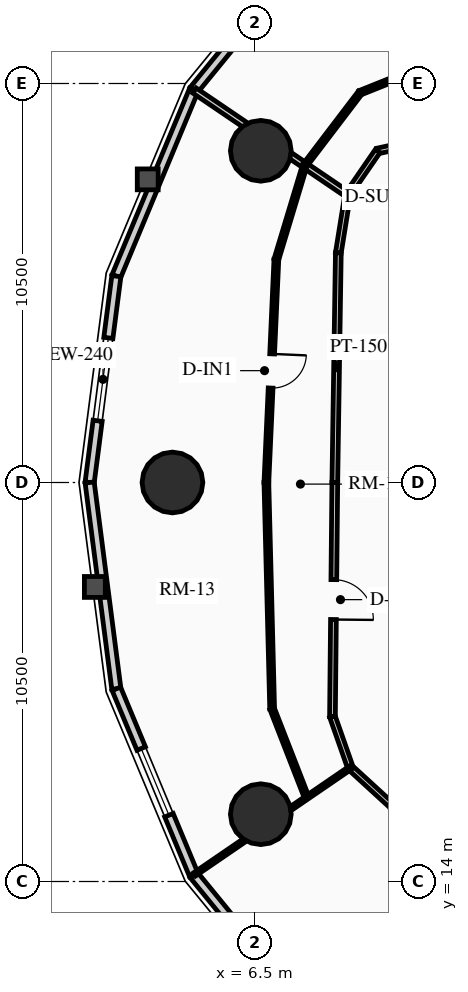
"""IFC4 building model, lengths in metres.
Left out: names, types, materials, properties, quantities, classifications, styles, units other than length and angle.
Written with IfcOpenShell. Run it as: python <this file> out.ifc"""

import sys

from ifc_helpers import new_model, si_unit, direction, frame, frame_2d, origin, origin_2d, place, context, subcontext, project, spatial, rectangle, circle, extrude, source, transform, mapped, element, fill, save


model = new_model("IFC4")
c1 = context("Model", 3, precision=1e-05, world=origin(), true_north=direction((0.0, 1.0)))
c2 = subcontext(c1, "Body", "Model", "MODEL_VIEW")
j1 = project(units=[si_unit("LENGTHUNIT", "METRE"), si_unit("PLANEANGLEUNIT", "RADIAN")], contexts=[c1])
p1 = place(None, origin())
s1 = spatial("IfcSite", under=j1, at=p1, CompositionType="ELEMENT")
p2 = place(p1, origin())
s2 = spatial("IfcBuilding", under=s1, at=p2, CompositionType="ELEMENT")
p3 = place(p2, frame((0.0, 0.0, 24.91)))
s3 = spatial("IfcBuildingStorey", under=s2, at=p3, CompositionType="ELEMENT", Elevation=24.91)
for number, where, z_axis, x_axis in (
    (1, (6.653, 33.229, 0.0), (0.0, 0.0, 1.0), (1.0, 0.0, 0.0)),
    (2, (4.328, 24.5, 0.0), (0.0, 0.0, 1.0), (1.0, 0.0, 0.0)),
    (3, (6.653, 15.771, 0.0), (0.0, 0.0, 1.0), (1.0, 0.0, 0.0)),
):
    element("IfcColumn", number, at=place(p3, frame(where, z_axis=z_axis, x_axis=x_axis)), inside=s3, PredefinedType="USERDEFINED", context=c2, shape_type="SweptSolid", body=[
        extrude(circle(Radius=0.8, at=origin_2d()), origin(), (0.0, 0.0, 1.0), 2.91),
    ])
p4 = place(p3, frame((4.89, 34.827, 0.0), z_axis=(0.0, 0.0, 1.0), x_axis=(0.632588557044, 0.774488035735, 0.0)))
e4 = element("IfcWall", 4, at=p4, inside=s3, PredefinedType="SOLIDWALL", context=c2, shape_type="SweptSolid", body=[
    extrude(rectangle(XDim=5.019, YDim=0.24, at=frame_2d((2.509, 0.0))), origin(), (0.0, 0.0, 1.0), 2.073),
])
m1 = source(origin(), c2, "Body", "SweptSolid", [
    extrude(rectangle(XDim=1.9, YDim=1.35, at=frame_2d((0.95, 0.675))), frame((0.0, 0.13, 0.0), z_axis=(0.0, -1.0, 0.0), x_axis=(1.0, 0.0, 0.0)), (0.0, 0.0, 1.0), 0.26),
])
p5 = place(p4, frame((1.559, 0.0, 0.65)))
e5 = element("IfcOpeningElement", 5, at=p5, cuts=e4, PredefinedType="OPENING", context=c2, shape_type="MappedRepresentation", body=[
    mapped(m1, transform((0.0, 0.0, 0.0), x_axis=(1.0, 0.0, 0.0), y_axis=(0.0, 1.0, 0.0), z_axis=(0.0, 0.0, 1.0), scale=1.0)),
])
p6 = place(p3, frame((2.851, 29.929, 0.0), z_axis=(0.0, 0.0, 1.0), x_axis=(0.384255919668, 0.923226618009, 0.0)))
e6 = element("IfcWall", 6, at=p6, inside=s3, PredefinedType="SOLIDWALL", context=c2, shape_type="SweptSolid", body=[
    extrude(rectangle(XDim=5.305, YDim=0.24, at=frame_2d((2.653, 0.0))), origin(), (0.0, 0.0, 1.0), 2.073),
])
p7 = place(p3, frame((2.149, 24.5, 0.0), z_axis=(0.0, 0.0, 1.0), x_axis=(0.128298189174, 0.991735637483, 0.0)))
e7 = element("IfcWall", 7, at=p7, inside=s3, PredefinedType="SOLIDWALL", context=c2, shape_type="SweptSolid", body=[
    extrude(rectangle(XDim=5.475, YDim=0.24, at=frame_2d((2.737, 0.0))), origin(), (0.0, 0.0, 1.0), 2.073),
])
m2 = source(origin(), c2, "Body", "SweptSolid", [
    extrude(rectangle(XDim=2.2, YDim=1.35, at=frame_2d((1.1, 0.675))), frame((0.0, 0.13, 0.0), z_axis=(0.0, -1.0, 0.0), x_axis=(1.0, 0.0, 0.0)), (0.0, 0.0, 1.0), 0.26),
])
p8 = place(p7, frame((1.637, 0.0, 0.65)))
e8 = element("IfcOpeningElement", 8, at=p8, cuts=e7, PredefinedType="OPENING", context=c2, shape_type="MappedRepresentation", body=[
    mapped(m2, transform((0.0, 0.0, 0.0), x_axis=(1.0, 0.0, 0.0), y_axis=(0.0, 1.0, 0.0), z_axis=(0.0, 0.0, 1.0), scale=1.0)),
])
p9 = place(p3, frame((2.851, 19.071, 0.0), z_axis=(0.0, 0.0, 1.0), x_axis=(-0.128298189174, 0.991735637483, 0.0)))
e9 = element("IfcWall", 9, at=p9, inside=s3, PredefinedType="SOLIDWALL", context=c2, shape_type="SweptSolid", body=[
    extrude(rectangle(XDim=5.475, YDim=0.24, at=frame_2d((2.737, 0.0))), origin(), (0.0, 0.0, 1.0), 2.073),
])
p10 = place(p3, frame((4.89, 14.173, 0.0), z_axis=(0.0, 0.0, 1.0), x_axis=(-0.384255919668, 0.923226618009, 0.0)))
e10 = element("IfcWall", 10, at=p10, inside=s3, PredefinedType="SOLIDWALL", context=c2, shape_type="SweptSolid", body=[
    extrude(rectangle(XDim=5.305, YDim=0.24, at=frame_2d((2.653, 0.0))), origin(), (0.0, 0.0, 1.0), 2.073),
])
p11 = place(p10, frame((1.703, 0.0, 0.65)))
e11 = element("IfcOpeningElement", 11, at=p11, cuts=e10, PredefinedType="OPENING", context=c2, shape_type="MappedRepresentation", body=[
    mapped(m1, transform((0.0, 0.0, 0.0), x_axis=(1.0, 0.0, 0.0), y_axis=(0.0, 1.0, 0.0), z_axis=(0.0, 0.0, 1.0), scale=1.0)),
])
p12 = place(p3, frame((8.065, 10.286, 0.0), z_axis=(0.0, 0.0, 1.0), x_axis=(-0.632588557044, 0.774488035735, 0.0)))
e12 = element("IfcWall", 12, at=p12, inside=s3, PredefinedType="SOLIDWALL", context=c2, shape_type="SweptSolid", body=[
    extrude(rectangle(XDim=5.019, YDim=0.24, at=frame_2d((2.509, 0.0))), origin(), (0.0, 0.0, 1.0), 2.073),
])
p13 = place(p3, frame((11.62, 33.637, 0.0), z_axis=(0.0, 0.0, 1.0), x_axis=(-0.97702579435, -0.213121085711, 0.0)))
e13 = element("IfcWall", 13, at=p13, inside=s3, PredefinedType="PARTITIONING", context=c2, shape_type="SweptSolid", body=[
    extrude(rectangle(XDim=1.935, YDim=0.15, at=frame_2d((0.967, 0.0))), origin(), (0.0, 0.0, 1.0), 2.159),
])
m3 = source(origin(), c2, "Body", "SweptSolid", [
    extrude(rectangle(XDim=1.05, YDim=2.015, at=frame_2d((0.525, 1.007))), frame((0.0, 0.085, 0.0), z_axis=(0.0, -1.0, 0.0), x_axis=(1.0, 0.0, 0.0)), (0.0, 0.0, 1.0), 0.17),
])
p14 = place(p13, frame((0.442, 0.0, 0.0)))
e14 = element("IfcOpeningElement", 14, at=p14, cuts=e13, PredefinedType="OPENING", context=c2, shape_type="MappedRepresentation", body=[
    mapped(m3, transform((0.0, 0.0, 0.0), x_axis=(1.0, 0.0, 0.0), y_axis=(0.0, 1.0, 0.0), z_axis=(0.0, 0.0, 1.0), scale=1.0)),
])
p15 = place(p3, frame((9.729, 33.225, 0.0), z_axis=(0.0, 0.0, 1.0), x_axis=(-0.567183649484, -0.82359134755, 0.0)))
e15 = element("IfcWall", 15, at=p15, inside=s3, PredefinedType="PARTITIONING", context=c2, shape_type="SweptSolid", body=[
    extrude(rectangle(XDim=1.392, YDim=0.15, at=frame_2d((0.696, 0.0))), origin(), (0.0, 0.0, 1.0), 2.159),
])
p16 = place(p3, frame((8.94, 32.078, 0.0), z_axis=(0.0, 0.0, 1.0), x_axis=(-0.159148467753, -0.98725466077, 0.0)))
e16 = element("IfcWall", 16, at=p16, inside=s3, PredefinedType="PARTITIONING", context=c2, shape_type="SweptSolid", body=[
    extrude(rectangle(XDim=1.554, YDim=0.15, at=frame_2d((0.777, 0.0))), origin(), (0.0, 0.0, 1.0), 2.205),
])
p17 = place(p3, frame((8.693, 30.544, 0.0), z_axis=(0.0, 0.0, 1.0), x_axis=(-0.015307007986, -0.99988284089, 0.0)))
e17 = element("IfcWall", 17, at=p17, inside=s3, PredefinedType="PARTITIONING", context=c2, shape_type="SweptSolid", body=[
    extrude(rectangle(XDim=6.045, YDim=0.15, at=frame_2d((3.022, 0.0))), origin(), (0.0, 0.0, 1.0), 2.635),
])
p18 = place(p3, frame((8.6, 24.5, 0.0), z_axis=(0.0, 0.0, 1.0), x_axis=(-0.010023665349, -0.999949761805, 0.0)))
e18 = element("IfcWall", 18, at=p18, inside=s3, PredefinedType="PARTITIONING", context=c2, shape_type="SweptSolid", body=[
    extrude(rectangle(XDim=6.162, YDim=0.15, at=frame_2d((3.081, 0.0))), origin(), (0.0, 0.0, 1.0), 2.159),
])
p19 = place(p18, frame((2.556, 0.0, 0.0)))
e19 = element("IfcOpeningElement", 19, at=p19, cuts=e18, PredefinedType="OPENING", context=c2, shape_type="MappedRepresentation", body=[
    mapped(m3, transform((0.0, 0.0, 0.0), x_axis=(1.0, 0.0, 0.0), y_axis=(0.0, 1.0, 0.0), z_axis=(0.0, 0.0, 1.0), scale=1.0)),
])
p20 = place(p3, frame((8.538, 18.338, 0.0), z_axis=(0.0, 0.0, 1.0), x_axis=(0.331358150167, -0.94350504838, 0.0)))
e20 = element("IfcWall", 20, at=p20, inside=s3, PredefinedType="PARTITIONING", context=c2, shape_type="SweptSolid", body=[
    extrude(rectangle(XDim=1.424, YDim=0.15, at=frame_2d((0.712, 0.0))), origin(), (0.0, 0.0, 1.0), 2.205),
])
p21 = place(p3, frame((9.01, 16.994, 0.0), z_axis=(0.0, 0.0, 1.0), x_axis=(0.737701798986, -0.67512669609, 0.0)))
e21 = element("IfcWall", 21, at=p21, inside=s3, PredefinedType="PARTITIONING", context=c2, shape_type="SweptSolid", body=[
    extrude(rectangle(XDim=1.498, YDim=0.15, at=frame_2d((0.749, 0.0))), origin(), (0.0, 0.0, 1.0), 2.159),
])
p22 = place(p3, frame((8.94, 32.078, 0.0), z_axis=(0.0, 0.0, 1.0), x_axis=(-0.827476605417, 0.561500193666, 0.0)))
e22 = element("IfcWall", 22, at=p22, inside=s3, PredefinedType="PARTITIONING", context=c2, shape_type="SweptSolid", body=[
    extrude(rectangle(XDim=4.875, YDim=0.16, at=frame_2d((2.438, 0.0))), origin(), (0.0, 0.0, 1.0), 2.073),
])
p23 = place(p3, frame((9.01, 16.994, 0.0), z_axis=(0.0, 0.0, 1.0), x_axis=(-0.825130244962, -0.564942544733, 0.0)))
e23 = element("IfcWall", 23, at=p23, inside=s3, PredefinedType="MOVABLE", context=c2, shape_type="SweptSolid", body=[
    extrude(rectangle(XDim=4.974, YDim=0.1, at=frame_2d((2.487, 0.0))), origin(), (0.0, 0.0, 1.0), 2.073),
])
p24 = place(p3, frame((11.746, 35.752, 0.0), z_axis=(0.0, 0.0, 1.0), x_axis=(-0.928091790064, -0.372351486119, 0.0)))
e24 = element("IfcWall", 24, at=p24, inside=s3, PredefinedType="PARTITIONING", context=c2, shape_type="SweptSolid", body=[
    extrude(rectangle(XDim=2.672, YDim=0.125, at=frame_2d((1.336, 0.0))), origin(), (0.0, 0.0, 1.0), 2.205),
])
m4 = source(origin(), c2, "Body", "SweptSolid", [
    extrude(rectangle(XDim=0.9, YDim=2.005, at=frame_2d((0.45, 1.002))), frame((0.0, 0.073, 0.0), z_axis=(0.0, -1.0, 0.0), x_axis=(1.0, 0.0, 0.0)), (0.0, 0.0, 1.0), 0.145),
])
p25 = place(p24, frame((0.886, 0.0, 0.0)))
e25 = element("IfcOpeningElement", 25, at=p25, cuts=e24, PredefinedType="OPENING", context=c2, shape_type="MappedRepresentation", body=[
    mapped(m4, transform((0.0, 0.0, 0.0), x_axis=(1.0, 0.0, 0.0), y_axis=(0.0, 1.0, 0.0), z_axis=(0.0, 0.0, 1.0), scale=1.0)),
])
p26 = place(p3, frame((9.267, 34.757, 0.0), z_axis=(0.0, 0.0, 1.0), x_axis=(-0.60573716219, -0.795664810295, 0.0)))
e26 = element("IfcWall", 26, at=p26, inside=s3, PredefinedType="PARTITIONING", context=c2, shape_type="SweptSolid", body=[
    extrude(rectangle(XDim=2.404, YDim=0.125, at=frame_2d((1.202, 0.0))), origin(), (0.0, 0.0, 1.0), 2.159),
])
p27 = place(p3, frame((7.811, 32.845, 0.0), z_axis=(0.0, 0.0, 1.0), x_axis=(-0.289357304294, -0.957221160679, 0.0)))
e27 = element("IfcWall", 27, at=p27, inside=s3, PredefinedType="PARTITIONING", context=c2, shape_type="SweptSolid", body=[
    extrude(rectangle(XDim=2.585, YDim=0.125, at=frame_2d((1.292, 0.0))), origin(), (0.0, 0.0, 1.0), 2.159),
])
p28 = place(p3, frame((7.062, 30.37, 0.0), z_axis=(0.0, 0.0, 1.0), x_axis=(-0.044789476409, -0.998996447843, 0.0)))
e28 = element("IfcWall", 28, at=p28, inside=s3, PredefinedType="PARTITIONING", context=c2, shape_type="SweptSolid", body=[
    extrude(rectangle(XDim=5.876, YDim=0.125, at=frame_2d((2.938, 0.0))), origin(), (0.0, 0.0, 1.0), 2.635),
])
p29 = place(p28, frame((2.488, 0.0, 0.0)))
e29 = element("IfcOpeningElement", 29, at=p29, cuts=e28, PredefinedType="OPENING", context=c2, shape_type="MappedRepresentation", body=[
    mapped(m4, transform((0.0, 0.0, 0.0), x_axis=(1.0, 0.0, 0.0), y_axis=(0.0, 1.0, 0.0), z_axis=(0.0, 0.0, 1.0), scale=1.0)),
])
p30 = place(p3, frame((6.799, 24.5, 0.0), z_axis=(0.0, 0.0, 1.0), x_axis=(0.02553283421, -0.999673984045, 0.0)))
e30 = element("IfcWall", 30, at=p30, inside=s3, PredefinedType="PARTITIONING", context=c2, shape_type="SweptSolid", body=[
    extrude(rectangle(XDim=5.957, YDim=0.125, at=frame_2d((2.979, 0.0))), origin(), (0.0, 0.0, 1.0), 2.159),
])
p31 = place(p3, frame((6.951, 18.545, 0.0), z_axis=(0.0, 0.0, 1.0), x_axis=(0.362681113276, -0.931913306093, 0.0)))
e31 = element("IfcWall", 31, at=p31, inside=s3, PredefinedType="PARTITIONING", context=c2, shape_type="SweptSolid", body=[
    extrude(rectangle(XDim=2.508, YDim=0.125, at=frame_2d((1.254, 0.0))), origin(), (0.0, 0.0, 1.0), 2.159),
])
m5 = source(origin(), c2, "Body", "SweptSolid", [
    extrude(rectangle(XDim=2.2, YDim=1.35, at=frame_2d((1.1, 0.675))), frame((0.0, 0.03, 0.0), z_axis=(0.0, -1.0, 0.0), x_axis=(1.0, 0.0, 0.0)), (0.0, 0.0, 1.0), 0.06),
])
p32 = place(p8, origin())
e32 = element("IfcWindow", 32, at=p32, inside=s3, PartitioningType="DOUBLE_PANEL_VERTICAL", PredefinedType="WINDOW", context=c2, shape_type="MappedRepresentation", body=[
    mapped(m5, transform((0.0, 0.0, 0.0), x_axis=(1.0, 0.0, 0.0), y_axis=(0.0, 1.0, 0.0), z_axis=(0.0, 0.0, 1.0), scale=1.0)),
])
fill(e8, e32)
m6 = source(origin(), c2, "Body", "SweptSolid", [
    extrude(rectangle(XDim=1.9, YDim=1.35, at=frame_2d((0.95, 0.675))), frame((0.0, 0.03, 0.0), z_axis=(0.0, -1.0, 0.0), x_axis=(1.0, 0.0, 0.0)), (0.0, 0.0, 1.0), 0.06),
])
p33 = place(p11, origin())
e33 = element("IfcWindow", 33, at=p33, inside=s3, PartitioningType="DOUBLE_PANEL_VERTICAL", PredefinedType="WINDOW", context=c2, shape_type="MappedRepresentation", body=[
    mapped(m6, transform((0.0, 0.0, 0.0), x_axis=(1.0, 0.0, 0.0), y_axis=(0.0, 1.0, 0.0), z_axis=(0.0, 0.0, 1.0), scale=1.0)),
])
fill(e11, e33)
m7 = source(origin(), c2, "Body", "SweptSolid", [
    extrude(rectangle(XDim=1.05, YDim=2.015, at=frame_2d((0.525, 1.007))), frame((0.0, 0.025, 0.0), z_axis=(0.0, -1.0, 0.0), x_axis=(1.0, 0.0, 0.0)), (0.0, 0.0, 1.0), 0.05),
])
p34 = place(p19, origin())
e34 = element("IfcDoor", 34, at=p34, inside=s3, OperationType="SINGLE_SWING_RIGHT", PredefinedType="DOOR", context=c2, shape_type="MappedRepresentation", body=[
    mapped(m7, transform((0.0, 0.0, 0.0), x_axis=(1.0, 0.0, 0.0), y_axis=(0.0, 1.0, 0.0), z_axis=(0.0, 0.0, 1.0), scale=1.0)),
])
fill(e19, e34)
m8 = source(origin(), c2, "Body", "SweptSolid", [
    extrude(rectangle(XDim=0.9, YDim=2.005, at=frame_2d((0.45, 1.002))), frame((0.0, 0.025, 0.0), z_axis=(0.0, -1.0, 0.0), x_axis=(1.0, 0.0, 0.0)), (0.0, 0.0, 1.0), 0.05),
])
p35 = place(p29, origin())
e35 = element("IfcDoor", 35, at=p35, inside=s3, OperationType="SINGLE_SWING_LEFT", PredefinedType="DOOR", context=c2, shape_type="MappedRepresentation", body=[
    mapped(m8, transform((0.0, 0.0, 0.0), x_axis=(1.0, 0.0, 0.0), y_axis=(0.0, 1.0, 0.0), z_axis=(0.0, 0.0, 1.0), scale=1.0)),
])
fill(e29, e35)
save(model, sys.argv[1])
